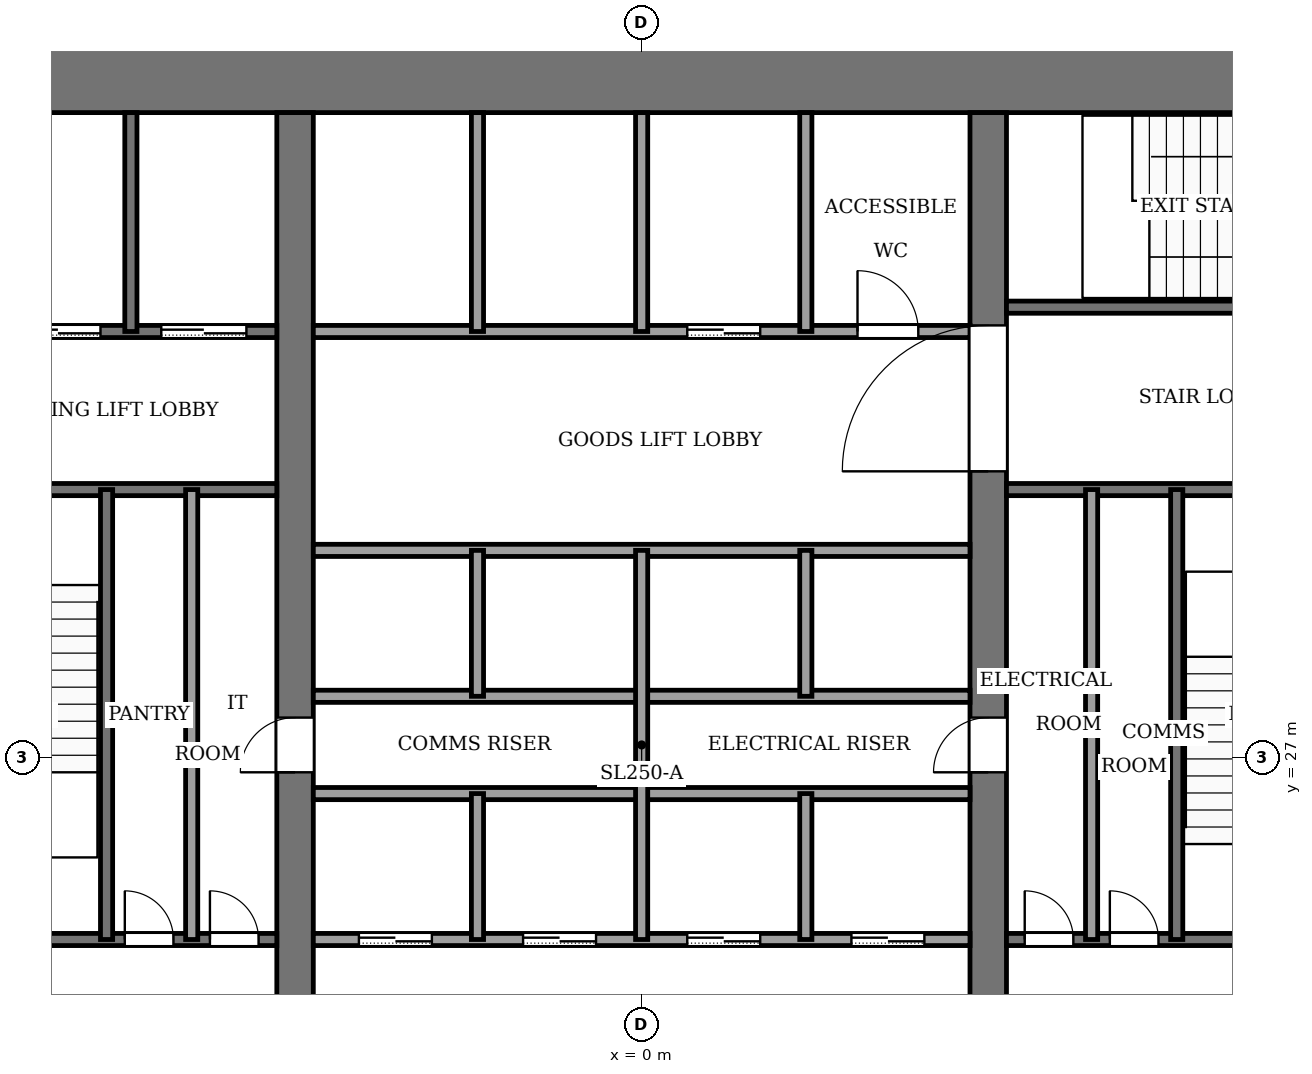
"""IFC4 building model, lengths in metres.
Left out: names, types, materials, properties, quantities, classifications, styles, units other than length and angle.
Written with IfcOpenShell. Run it as: python <this file> out.ifc"""

import sys

from ifc_helpers import new_model, si_unit, direction, frame, frame_2d, origin, place, context, subcontext, project, spatial, rectangle, extrude, element, fill, save


model = new_model("IFC4")
c1 = context("Model", 3, precision=1e-05, world=origin(), true_north=direction((0.0, 1.0)))
c2 = subcontext(c1, "Body", "Model", "MODEL_VIEW")
j1 = project(units=[si_unit("LENGTHUNIT", "METRE"), si_unit("PLANEANGLEUNIT", "RADIAN")], contexts=[c1])
p1 = place(None, origin())
s1 = spatial("IfcSite", under=j1, at=p1, CompositionType="ELEMENT")
p2 = place(p1, origin())
s2 = spatial("IfcBuilding", under=s1, at=p2, CompositionType="ELEMENT")
p3 = place(p2, frame((0.0, 0.0, 78.0)))
s3 = spatial("IfcBuildingStorey", under=s2, at=p3, CompositionType="ELEMENT", Elevation=78.0)
p4 = place(p3, frame((-13.8, 38.2, -0.13), z_axis=(0.0, 0.0, 1.0), x_axis=(1.0, 0.0, 0.0)))
e1 = element("IfcWall", 1, at=p4, inside=s3, PredefinedType="SHEAR", context=c2, shape_type="SweptSolid", body=[
    extrude(rectangle(XDim=27.6, YDim=1.2, at=frame_2d((13.8, 0.0))), origin(), (0.0, 0.0, 1.0), 4.0),
])
p5 = place(p3, frame((-5.7, 18.4, -0.13), z_axis=(0.0, 0.0, 1.0), x_axis=(0.0, 1.0, 0.0)))
e2 = element("IfcWall", 2, at=p5, inside=s3, PredefinedType="SHEAR", context=c2, shape_type="SweptSolid", body=[
    extrude(rectangle(XDim=19.2, YDim=0.6, at=frame_2d((9.6, 0.0))), origin(), (0.0, 0.0, 1.0), 4.0),
])
p6 = place(p5, frame((8.35, 0.0, 0.13)))
e3 = element("IfcOpeningElement", 3, at=p6, cuts=e2, PredefinedType="OPENING", context=c2, shape_type="SweptSolid", body=[
    extrude(rectangle(XDim=0.9, YDim=2.1, at=frame_2d((0.45, 1.05))), frame((0.0, 0.31, 0.0), z_axis=(0.0, -1.0, 0.0), x_axis=(1.0, 0.0, 0.0)), (0.0, 0.0, 1.0), 0.62),
])
p7 = place(p3, frame((5.7, 18.4, -0.13), z_axis=(0.0, 0.0, 1.0), x_axis=(0.0, 1.0, 0.0)))
e4 = element("IfcWall", 4, at=p7, inside=s3, PredefinedType="SHEAR", context=c2, shape_type="SweptSolid", body=[
    extrude(rectangle(XDim=19.2, YDim=0.6, at=frame_2d((9.6, 0.0))), origin(), (0.0, 0.0, 1.0), 4.0),
])
p8 = place(p7, frame((8.35, 0.0, 0.13)))
e5 = element("IfcOpeningElement", 5, at=p8, cuts=e4, PredefinedType="OPENING", context=c2, shape_type="SweptSolid", body=[
    extrude(rectangle(XDim=0.9, YDim=2.1, at=frame_2d((0.45, 1.05))), frame((0.0, 0.31, 0.0), z_axis=(0.0, -1.0, 0.0), x_axis=(1.0, 0.0, 0.0)), (0.0, 0.0, 1.0), 0.62),
])
p9 = place(p7, frame((13.3, 0.0, 0.13)))
e6 = element("IfcOpeningElement", 6, at=p9, cuts=e4, PredefinedType="OPENING", context=c2, shape_type="SweptSolid", body=[
    extrude(rectangle(XDim=2.4, YDim=2.4, at=frame_2d((1.2, 1.2))), frame((0.0, 0.31, 0.0), z_axis=(0.0, -1.0, 0.0), x_axis=(1.0, 0.0, 0.0)), (0.0, 0.0, 1.0), 0.62),
])
p10 = place(p3, frame((-12.6, 24.0, 0.0), z_axis=(0.0, 0.0, 1.0), x_axis=(1.0, 0.0, 0.0)))
e7 = element("IfcWall", 7, at=p10, inside=s3, PredefinedType="PARTITIONING", context=c2, shape_type="SweptSolid", body=[
    extrude(rectangle(XDim=6.6, YDim=0.2, at=frame_2d((3.3, 0.0))), origin(), (0.0, 0.0, 1.0), 3.87),
])
p11 = place(p10, frame((4.1, 0.0, 0.0)))
e8 = element("IfcOpeningElement", 8, at=p11, cuts=e7, PredefinedType="OPENING", context=c2, shape_type="SweptSolid", body=[
    extrude(rectangle(XDim=0.8, YDim=2.1, at=frame_2d((0.4, 1.05))), frame((0.0, 0.11, 0.0), z_axis=(0.0, -1.0, 0.0), x_axis=(1.0, 0.0, 0.0)), (0.0, 0.0, 1.0), 0.22),
])
p12 = place(p10, frame((5.5, 0.0, 0.0)))
e9 = element("IfcOpeningElement", 9, at=p12, cuts=e7, PredefinedType="OPENING", context=c2, shape_type="SweptSolid", body=[
    extrude(rectangle(XDim=0.8, YDim=2.1, at=frame_2d((0.4, 1.05))), frame((0.0, 0.11, 0.0), z_axis=(0.0, -1.0, 0.0), x_axis=(1.0, 0.0, 0.0)), (0.0, 0.0, 1.0), 0.22),
])
p13 = place(p3, frame((-5.4, 24.0, 0.0), z_axis=(0.0, 0.0, 1.0), x_axis=(1.0, 0.0, 0.0)))
e10 = element("IfcWall", 10, at=p13, inside=s3, PredefinedType="PARTITIONING", context=c2, shape_type="SweptSolid", body=[
    extrude(rectangle(XDim=10.8, YDim=0.2, at=frame_2d((5.4, 0.0))), origin(), (0.0, 0.0, 1.0), 3.87),
])
p14 = place(p13, frame((0.75, 0.0, 0.0)))
e11 = element("IfcOpeningElement", 11, at=p14, cuts=e10, PredefinedType="OPENING", context=c2, shape_type="SweptSolid", body=[
    extrude(rectangle(XDim=1.2, YDim=2.2, at=frame_2d((0.6, 1.1))), frame((0.0, 0.11, 0.0), z_axis=(0.0, -1.0, 0.0), x_axis=(1.0, 0.0, 0.0)), (0.0, 0.0, 1.0), 0.22),
])
p15 = place(p13, frame((3.45, 0.0, 0.0)))
e12 = element("IfcOpeningElement", 12, at=p15, cuts=e10, PredefinedType="OPENING", context=c2, shape_type="SweptSolid", body=[
    extrude(rectangle(XDim=1.2, YDim=2.2, at=frame_2d((0.6, 1.1))), frame((0.0, 0.11, 0.0), z_axis=(0.0, -1.0, 0.0), x_axis=(1.0, 0.0, 0.0)), (0.0, 0.0, 1.0), 0.22),
])
p16 = place(p13, frame((6.15, 0.0, 0.0)))
e13 = element("IfcOpeningElement", 13, at=p16, cuts=e10, PredefinedType="OPENING", context=c2, shape_type="SweptSolid", body=[
    extrude(rectangle(XDim=1.2, YDim=2.2, at=frame_2d((0.6, 1.1))), frame((0.0, 0.11, 0.0), z_axis=(0.0, -1.0, 0.0), x_axis=(1.0, 0.0, 0.0)), (0.0, 0.0, 1.0), 0.22),
])
p17 = place(p13, frame((8.85, 0.0, 0.0)))
e14 = element("IfcOpeningElement", 14, at=p17, cuts=e10, PredefinedType="OPENING", context=c2, shape_type="SweptSolid", body=[
    extrude(rectangle(XDim=1.2, YDim=2.2, at=frame_2d((0.6, 1.1))), frame((0.0, 0.11, 0.0), z_axis=(0.0, -1.0, 0.0), x_axis=(1.0, 0.0, 0.0)), (0.0, 0.0, 1.0), 0.22),
])
p18 = place(p3, frame((6.0, 24.0, 0.0), z_axis=(0.0, 0.0, 1.0), x_axis=(1.0, 0.0, 0.0)))
e15 = element("IfcWall", 15, at=p18, inside=s3, PredefinedType="PARTITIONING", context=c2, shape_type="SweptSolid", body=[
    extrude(rectangle(XDim=6.6, YDim=0.2, at=frame_2d((3.3, 0.0))), origin(), (0.0, 0.0, 1.0), 3.87),
])
p19 = place(p18, frame((0.3, 0.0, 0.0)))
e16 = element("IfcOpeningElement", 16, at=p19, cuts=e15, PredefinedType="OPENING", context=c2, shape_type="SweptSolid", body=[
    extrude(rectangle(XDim=0.8, YDim=2.1, at=frame_2d((0.4, 1.05))), frame((0.0, 0.11, 0.0), z_axis=(0.0, -1.0, 0.0), x_axis=(1.0, 0.0, 0.0)), (0.0, 0.0, 1.0), 0.22),
])
p20 = place(p18, frame((1.7, 0.0, 0.0)))
e17 = element("IfcOpeningElement", 17, at=p20, cuts=e15, PredefinedType="OPENING", context=c2, shape_type="SweptSolid", body=[
    extrude(rectangle(XDim=0.8, YDim=2.1, at=frame_2d((0.4, 1.05))), frame((0.0, 0.11, 0.0), z_axis=(0.0, -1.0, 0.0), x_axis=(1.0, 0.0, 0.0)), (0.0, 0.0, 1.0), 0.22),
])
p21 = place(p18, frame((4.4, 0.0, 0.0)))
e18 = element("IfcOpeningElement", 18, at=p21, cuts=e15, PredefinedType="OPENING", context=c2, shape_type="SweptSolid", body=[
    extrude(rectangle(XDim=1.2, YDim=2.2, at=frame_2d((0.6, 1.1))), frame((0.0, 0.11, 0.0), z_axis=(0.0, -1.0, 0.0), x_axis=(1.0, 0.0, 0.0)), (0.0, 0.0, 1.0), 0.22),
])
for number, where, z_axis, x_axis in (
    (19, (-5.4, 26.4, 0.0), (0.0, 0.0, 1.0), (1.0, 0.0, 0.0)),
    (20, (-5.4, 28.0, 0.0), (0.0, 0.0, 1.0), (1.0, 0.0, 0.0)),
    (21, (-5.4, 30.4, 0.0), (0.0, 0.0, 1.0), (1.0, 0.0, 0.0)),
):
    element("IfcWall", number, at=place(p3, frame(where, z_axis=z_axis, x_axis=x_axis)), inside=s3, PredefinedType="PARTITIONING", context=c2, shape_type="SweptSolid", body=[
        extrude(rectangle(XDim=10.8, YDim=0.2, at=frame_2d((5.4, 0.0))), origin(), (0.0, 0.0, 1.0), 3.87),
    ])
p22 = place(p3, frame((-12.6, 31.4, 0.0), z_axis=(0.0, 0.0, 1.0), x_axis=(1.0, 0.0, 0.0)))
e22 = element("IfcWall", 22, at=p22, inside=s3, PredefinedType="PARTITIONING", context=c2, shape_type="SweptSolid", body=[
    extrude(rectangle(XDim=6.6, YDim=0.2, at=frame_2d((3.3, 0.0))), origin(), (0.0, 0.0, 1.0), 3.87),
])
p23 = place(p22, frame((1.0, 0.0, 0.0)))
e23 = element("IfcOpeningElement", 23, at=p23, cuts=e22, PredefinedType="OPENING", context=c2, shape_type="SweptSolid", body=[
    extrude(rectangle(XDim=1.2, YDim=2.2, at=frame_2d((0.6, 1.1))), frame((0.0, 0.11, 0.0), z_axis=(0.0, -1.0, 0.0), x_axis=(1.0, 0.0, 0.0)), (0.0, 0.0, 1.0), 0.22),
])
p24 = place(p3, frame((6.0, 31.4, 0.0), z_axis=(0.0, 0.0, 1.0), x_axis=(1.0, 0.0, 0.0)))
e24 = element("IfcWall", 24, at=p24, inside=s3, PredefinedType="PARTITIONING", context=c2, shape_type="SweptSolid", body=[
    extrude(rectangle(XDim=6.6, YDim=0.2, at=frame_2d((3.3, 0.0))), origin(), (0.0, 0.0, 1.0), 3.87),
])
p25 = place(p3, frame((-12.6, 34.0, 0.0), z_axis=(0.0, 0.0, 1.0), x_axis=(1.0, 0.0, 0.0)))
e25 = element("IfcWall", 25, at=p25, inside=s3, PredefinedType="PARTITIONING", context=c2, shape_type="SweptSolid", body=[
    extrude(rectangle(XDim=6.6, YDim=0.2, at=frame_2d((3.3, 0.0))), origin(), (0.0, 0.0, 1.0), 3.87),
])
p26 = place(p25, frame((4.7, 0.0, 0.0)))
e26 = element("IfcOpeningElement", 26, at=p26, cuts=e25, PredefinedType="OPENING", context=c2, shape_type="SweptSolid", body=[
    extrude(rectangle(XDim=1.4, YDim=2.2, at=frame_2d((0.7, 1.1))), frame((0.0, 0.11, 0.0), z_axis=(0.0, -1.0, 0.0), x_axis=(1.0, 0.0, 0.0)), (0.0, 0.0, 1.0), 0.22),
])
p27 = place(p25, frame((2.3, 0.0, 0.0)))
e27 = element("IfcOpeningElement", 27, at=p27, cuts=e25, PredefinedType="OPENING", context=c2, shape_type="SweptSolid", body=[
    extrude(rectangle(XDim=1.4, YDim=2.2, at=frame_2d((0.7, 1.1))), frame((0.0, 0.11, 0.0), z_axis=(0.0, -1.0, 0.0), x_axis=(1.0, 0.0, 0.0)), (0.0, 0.0, 1.0), 0.22),
])
p28 = place(p25, frame((0.45, 0.0, 0.0)))
e28 = element("IfcOpeningElement", 28, at=p28, cuts=e25, PredefinedType="OPENING", context=c2, shape_type="SweptSolid", body=[
    extrude(rectangle(XDim=0.9, YDim=2.1, at=frame_2d((0.45, 1.05))), frame((0.0, 0.11, 0.0), z_axis=(0.0, -1.0, 0.0), x_axis=(1.0, 0.0, 0.0)), (0.0, 0.0, 1.0), 0.22),
])
p29 = place(p3, frame((-5.4, 34.0, 0.0), z_axis=(0.0, 0.0, 1.0), x_axis=(1.0, 0.0, 0.0)))
e29 = element("IfcWall", 29, at=p29, inside=s3, PredefinedType="PARTITIONING", context=c2, shape_type="SweptSolid", body=[
    extrude(rectangle(XDim=10.8, YDim=0.2, at=frame_2d((5.4, 0.0))), origin(), (0.0, 0.0, 1.0), 3.87),
])
p30 = place(p29, frame((6.15, 0.0, 0.0)))
e30 = element("IfcOpeningElement", 30, at=p30, cuts=e29, PredefinedType="OPENING", context=c2, shape_type="SweptSolid", body=[
    extrude(rectangle(XDim=1.2, YDim=2.2, at=frame_2d((0.6, 1.1))), frame((0.0, 0.11, 0.0), z_axis=(0.0, -1.0, 0.0), x_axis=(1.0, 0.0, 0.0)), (0.0, 0.0, 1.0), 0.22),
])
p31 = place(p29, frame((8.95, 0.0, 0.0)))
e31 = element("IfcOpeningElement", 31, at=p31, cuts=e29, PredefinedType="OPENING", context=c2, shape_type="SweptSolid", body=[
    extrude(rectangle(XDim=1.0, YDim=2.1, at=frame_2d((0.5, 1.05))), frame((0.0, 0.11, 0.0), z_axis=(0.0, -1.0, 0.0), x_axis=(1.0, 0.0, 0.0)), (0.0, 0.0, 1.0), 0.22),
])
p32 = place(p3, frame((6.0, 34.4, 0.0), z_axis=(0.0, 0.0, 1.0), x_axis=(1.0, 0.0, 0.0)))
e32 = element("IfcWall", 32, at=p32, inside=s3, PredefinedType="PARTITIONING", context=c2, shape_type="SweptSolid", body=[
    extrude(rectangle(XDim=6.6, YDim=0.2, at=frame_2d((3.3, 0.0))), origin(), (0.0, 0.0, 1.0), 3.87),
])
p33 = place(p32, frame((4.8, 0.0, 0.0)))
e33 = element("IfcOpeningElement", 33, at=p33, cuts=e32, PredefinedType="OPENING", context=c2, shape_type="SweptSolid", body=[
    extrude(rectangle(XDim=1.2, YDim=2.2, at=frame_2d((0.6, 1.1))), frame((0.0, 0.11, 0.0), z_axis=(0.0, -1.0, 0.0), x_axis=(1.0, 0.0, 0.0)), (0.0, 0.0, 1.0), 0.22),
])
p34 = place(p3, frame((-8.8, 24.0, 0.0), z_axis=(0.0, 0.0, 1.0), x_axis=(0.0, 1.0, 0.0)))
e34 = element("IfcWall", 34, at=p34, inside=s3, PredefinedType="PARTITIONING", context=c2, shape_type="SweptSolid", body=[
    extrude(rectangle(XDim=7.4, YDim=0.2, at=frame_2d((3.7, 0.0))), origin(), (0.0, 0.0, 1.0), 3.87),
])
p35 = place(p3, frame((-8.4, 34.0, 0.0), z_axis=(0.0, 0.0, 1.0), x_axis=(0.0, 1.0, 0.0)))
e35 = element("IfcWall", 35, at=p35, inside=s3, PredefinedType="PARTITIONING", context=c2, shape_type="SweptSolid", body=[
    extrude(rectangle(XDim=3.6, YDim=0.2, at=frame_2d((1.8, 0.0))), origin(), (0.0, 0.0, 1.0), 3.87),
])
p36 = place(p3, frame((-7.4, 24.0, 0.0), z_axis=(0.0, 0.0, 1.0), x_axis=(0.0, 1.0, 0.0)))
e36 = element("IfcWall", 36, at=p36, inside=s3, PredefinedType="PARTITIONING", context=c2, shape_type="SweptSolid", body=[
    extrude(rectangle(XDim=7.4, YDim=0.2, at=frame_2d((3.7, 0.0))), origin(), (0.0, 0.0, 1.0), 3.87),
])
for number, where, z_axis, x_axis in (
    (37, (-2.7, 24.0, 0.0), (0.0, 0.0, 1.0), (0.0, 1.0, 0.0)),
    (38, (-2.7, 28.0, 0.0), (0.0, 0.0, 1.0), (0.0, 1.0, 0.0)),
):
    element("IfcWall", number, at=place(p3, frame(where, z_axis=z_axis, x_axis=x_axis)), inside=s3, PredefinedType="PARTITIONING", context=c2, shape_type="SweptSolid", body=[
        extrude(rectangle(XDim=2.4, YDim=0.2, at=frame_2d((1.2, 0.0))), origin(), (0.0, 0.0, 1.0), 3.87),
    ])
p37 = place(p3, frame((-2.7, 34.0, 0.0), z_axis=(0.0, 0.0, 1.0), x_axis=(0.0, 1.0, 0.0)))
e39 = element("IfcWall", 39, at=p37, inside=s3, PredefinedType="PARTITIONING", context=c2, shape_type="SweptSolid", body=[
    extrude(rectangle(XDim=3.6, YDim=0.2, at=frame_2d((1.8, 0.0))), origin(), (0.0, 0.0, 1.0), 3.87),
])
p38 = place(p3, frame((0.0, 24.0, 0.0), z_axis=(0.0, 0.0, 1.0), x_axis=(0.0, 1.0, 0.0)))
e40 = element("IfcWall", 40, at=p38, inside=s3, PredefinedType="PARTITIONING", context=c2, shape_type="SweptSolid", body=[
    extrude(rectangle(XDim=6.4, YDim=0.2, at=frame_2d((3.2, 0.0))), origin(), (0.0, 0.0, 1.0), 3.87),
])
p39 = place(p3, frame((0.0, 34.0, 0.0), z_axis=(0.0, 0.0, 1.0), x_axis=(0.0, 1.0, 0.0)))
e41 = element("IfcWall", 41, at=p39, inside=s3, PredefinedType="PARTITIONING", context=c2, shape_type="SweptSolid", body=[
    extrude(rectangle(XDim=3.6, YDim=0.2, at=frame_2d((1.8, 0.0))), origin(), (0.0, 0.0, 1.0), 3.87),
])
for number, where, z_axis, x_axis in (
    (42, (2.7, 24.0, 0.0), (0.0, 0.0, 1.0), (0.0, 1.0, 0.0)),
    (43, (2.7, 28.0, 0.0), (0.0, 0.0, 1.0), (0.0, 1.0, 0.0)),
):
    element("IfcWall", number, at=place(p3, frame(where, z_axis=z_axis, x_axis=x_axis)), inside=s3, PredefinedType="PARTITIONING", context=c2, shape_type="SweptSolid", body=[
        extrude(rectangle(XDim=2.4, YDim=0.2, at=frame_2d((1.2, 0.0))), origin(), (0.0, 0.0, 1.0), 3.87),
    ])
p40 = place(p3, frame((2.7, 34.0, 0.0), z_axis=(0.0, 0.0, 1.0), x_axis=(0.0, 1.0, 0.0)))
e44 = element("IfcWall", 44, at=p40, inside=s3, PredefinedType="PARTITIONING", context=c2, shape_type="SweptSolid", body=[
    extrude(rectangle(XDim=3.6, YDim=0.2, at=frame_2d((1.8, 0.0))), origin(), (0.0, 0.0, 1.0), 3.87),
])
for number, where, z_axis, x_axis in (
    (45, (7.4, 24.0, 0.0), (0.0, 0.0, 1.0), (0.0, 1.0, 0.0)),
    (46, (8.8, 24.0, 0.0), (0.0, 0.0, 1.0), (0.0, 1.0, 0.0)),
):
    element("IfcWall", number, at=place(p3, frame(where, z_axis=z_axis, x_axis=x_axis)), inside=s3, PredefinedType="PARTITIONING", context=c2, shape_type="SweptSolid", body=[
        extrude(rectangle(XDim=7.4, YDim=0.2, at=frame_2d((3.7, 0.0))), origin(), (0.0, 0.0, 1.0), 3.87),
    ])
p41 = place(p14, origin())
e47 = element("IfcDoor", 47, at=p41, inside=s3, OperationType="SLIDING_TO_LEFT", PredefinedType="DOOR", context=c2, shape_type="SweptSolid", body=[
    extrude(rectangle(XDim=1.2, YDim=2.2, at=frame_2d((0.6, 1.1))), frame((0.0, 0.025, 0.0), z_axis=(0.0, -1.0, 0.0), x_axis=(1.0, 0.0, 0.0)), (0.0, 0.0, 1.0), 0.05),
])
fill(e11, e47)
p42 = place(p15, origin())
e48 = element("IfcDoor", 48, at=p42, inside=s3, OperationType="SLIDING_TO_LEFT", PredefinedType="DOOR", context=c2, shape_type="SweptSolid", body=[
    extrude(rectangle(XDim=1.2, YDim=2.2, at=frame_2d((0.6, 1.1))), frame((0.0, 0.025, 0.0), z_axis=(0.0, -1.0, 0.0), x_axis=(1.0, 0.0, 0.0)), (0.0, 0.0, 1.0), 0.05),
])
fill(e12, e48)
p43 = place(p16, origin())
e49 = element("IfcDoor", 49, at=p43, inside=s3, OperationType="SLIDING_TO_LEFT", PredefinedType="DOOR", context=c2, shape_type="SweptSolid", body=[
    extrude(rectangle(XDim=1.2, YDim=2.2, at=frame_2d((0.6, 1.1))), frame((0.0, 0.025, 0.0), z_axis=(0.0, -1.0, 0.0), x_axis=(1.0, 0.0, 0.0)), (0.0, 0.0, 1.0), 0.05),
])
fill(e13, e49)
p44 = place(p17, origin())
e50 = element("IfcDoor", 50, at=p44, inside=s3, OperationType="SLIDING_TO_LEFT", PredefinedType="DOOR", context=c2, shape_type="SweptSolid", body=[
    extrude(rectangle(XDim=1.2, YDim=2.2, at=frame_2d((0.6, 1.1))), frame((0.0, 0.025, 0.0), z_axis=(0.0, -1.0, 0.0), x_axis=(1.0, 0.0, 0.0)), (0.0, 0.0, 1.0), 0.05),
])
fill(e14, e50)
p45 = place(p30, origin())
e51 = element("IfcDoor", 51, at=p45, inside=s3, OperationType="SLIDING_TO_LEFT", PredefinedType="DOOR", context=c2, shape_type="SweptSolid", body=[
    extrude(rectangle(XDim=1.2, YDim=2.2, at=frame_2d((0.6, 1.1))), frame((0.0, 0.025, 0.0), z_axis=(0.0, -1.0, 0.0), x_axis=(1.0, 0.0, 0.0)), (0.0, 0.0, 1.0), 0.05),
])
fill(e30, e51)
p46 = place(p26, origin())
e52 = element("IfcDoor", 52, at=p46, inside=s3, OperationType="SLIDING_TO_LEFT", PredefinedType="DOOR", context=c2, shape_type="SweptSolid", body=[
    extrude(rectangle(XDim=1.4, YDim=2.2, at=frame_2d((0.7, 1.1))), frame((0.0, 0.025, 0.0), z_axis=(0.0, -1.0, 0.0), x_axis=(1.0, 0.0, 0.0)), (0.0, 0.0, 1.0), 0.05),
])
fill(e26, e52)
p47 = place(p27, origin())
e53 = element("IfcDoor", 53, at=p47, inside=s3, OperationType="SLIDING_TO_LEFT", PredefinedType="DOOR", context=c2, shape_type="SweptSolid", body=[
    extrude(rectangle(XDim=1.4, YDim=2.2, at=frame_2d((0.7, 1.1))), frame((0.0, 0.025, 0.0), z_axis=(0.0, -1.0, 0.0), x_axis=(1.0, 0.0, 0.0)), (0.0, 0.0, 1.0), 0.05),
])
fill(e27, e53)
p48 = place(p11, origin())
e54 = element("IfcDoor", 54, at=p48, inside=s3, OperationType="SINGLE_SWING_RIGHT", PredefinedType="DOOR", context=c2, shape_type="SweptSolid", body=[
    extrude(rectangle(XDim=0.8, YDim=2.1, at=frame_2d((0.4, 1.05))), frame((0.0, 0.025, 0.0), z_axis=(0.0, -1.0, 0.0), x_axis=(1.0, 0.0, 0.0)), (0.0, 0.0, 1.0), 0.05),
])
fill(e8, e54)
p49 = place(p12, origin())
e55 = element("IfcDoor", 55, at=p49, inside=s3, OperationType="SINGLE_SWING_LEFT", PredefinedType="DOOR", context=c2, shape_type="SweptSolid", body=[
    extrude(rectangle(XDim=0.8, YDim=2.1, at=frame_2d((0.4, 1.05))), frame((0.0, 0.025, 0.0), z_axis=(0.0, -1.0, 0.0), x_axis=(1.0, 0.0, 0.0)), (0.0, 0.0, 1.0), 0.05),
])
fill(e9, e55)
p50 = place(p19, origin())
e56 = element("IfcDoor", 56, at=p50, inside=s3, OperationType="SINGLE_SWING_RIGHT", PredefinedType="DOOR", context=c2, shape_type="SweptSolid", body=[
    extrude(rectangle(XDim=0.8, YDim=2.1, at=frame_2d((0.4, 1.05))), frame((0.0, 0.025, 0.0), z_axis=(0.0, -1.0, 0.0), x_axis=(1.0, 0.0, 0.0)), (0.0, 0.0, 1.0), 0.05),
])
fill(e16, e56)
p51 = place(p20, origin())
e57 = element("IfcDoor", 57, at=p51, inside=s3, OperationType="SINGLE_SWING_LEFT", PredefinedType="DOOR", context=c2, shape_type="SweptSolid", body=[
    extrude(rectangle(XDim=0.8, YDim=2.1, at=frame_2d((0.4, 1.05))), frame((0.0, 0.025, 0.0), z_axis=(0.0, -1.0, 0.0), x_axis=(1.0, 0.0, 0.0)), (0.0, 0.0, 1.0), 0.05),
])
fill(e17, e57)
p52 = place(p31, origin())
e58 = element("IfcDoor", 58, at=p52, inside=s3, OperationType="SINGLE_SWING_LEFT", PredefinedType="DOOR", context=c2, shape_type="SweptSolid", body=[
    extrude(rectangle(XDim=1.0, YDim=2.1, at=frame_2d((0.5, 1.05))), frame((0.0, 0.025, 0.0), z_axis=(0.0, -1.0, 0.0), x_axis=(1.0, 0.0, 0.0)), (0.0, 0.0, 1.0), 0.05),
])
fill(e31, e58)
p53 = place(p6, origin())
e59 = element("IfcDoor", 59, at=p53, inside=s3, OperationType="SINGLE_SWING_LEFT", PredefinedType="DOOR", context=c2, shape_type="SweptSolid", body=[
    extrude(rectangle(XDim=0.9, YDim=2.1, at=frame_2d((0.45, 1.05))), frame((0.0, 0.025, 0.0), z_axis=(0.0, -1.0, 0.0), x_axis=(1.0, 0.0, 0.0)), (0.0, 0.0, 1.0), 0.05),
])
fill(e3, e59)
p54 = place(p8, origin())
e60 = element("IfcDoor", 60, at=p54, inside=s3, OperationType="SINGLE_SWING_RIGHT", PredefinedType="DOOR", context=c2, shape_type="SweptSolid", body=[
    extrude(rectangle(XDim=0.9, YDim=2.1, at=frame_2d((0.45, 1.05))), frame((0.0, 0.025, 0.0), z_axis=(0.0, -1.0, 0.0), x_axis=(1.0, 0.0, 0.0)), (0.0, 0.0, 1.0), 0.05),
])
fill(e5, e60)
p55 = place(p9, origin())
e61 = element("IfcDoor", 61, at=p55, inside=s3, OperationType="DOUBLE_DOOR_SINGLE_SWING", PredefinedType="DOOR", context=c2, shape_type="SweptSolid", body=[
    extrude(rectangle(XDim=2.4, YDim=2.4, at=frame_2d((1.2, 1.2))), frame((0.0, 0.025, 0.0), z_axis=(0.0, -1.0, 0.0), x_axis=(1.0, 0.0, 0.0)), (0.0, 0.0, 1.0), 0.05),
])
fill(e6, e61)
save(model, sys.argv[1])
